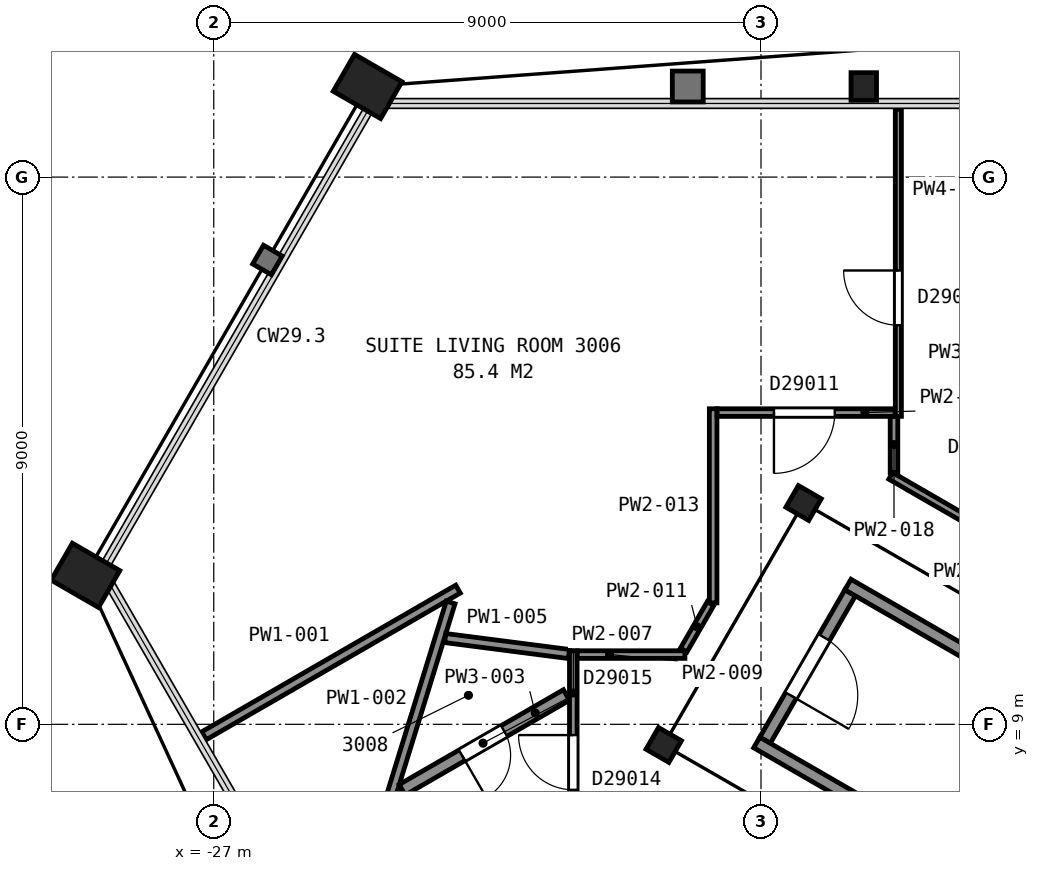
"""IFC4 building model, lengths in metres.
Left out: names, types, materials, properties, quantities, classifications, styles, units other than length and angle.
Written with IfcOpenShell. Run it as: python <this file> out.ifc"""

import sys

from ifc_helpers import new_model, si_unit, direction, frame, frame_2d, origin, origin_2d, place, context, subcontext, project, spatial, rectangle, hollow_rectangle, i_section, extrude, element, fill, save


model = new_model("IFC4")
c1 = context("Model", 3, precision=1e-05, world=origin(), true_north=direction((0.0, 1.0)))
c2 = subcontext(c1, "Body", "Model", "MODEL_VIEW")
j1 = project(units=[si_unit("LENGTHUNIT", "METRE"), si_unit("PLANEANGLEUNIT", "RADIAN")], contexts=[c1])
p1 = place(None, origin())
s1 = spatial("IfcSite", under=j1, at=p1, CompositionType="ELEMENT")
p2 = place(p1, origin())
s2 = spatial("IfcBuilding", under=s1, at=p2, CompositionType="ELEMENT")
p3 = place(p2, frame((0.0, 0.0, 125.2)))
s3 = spatial("IfcBuildingStorey", under=s2, at=p3, CompositionType="ELEMENT", Elevation=125.2)
p4 = place(p3, frame((-16.31, 19.49, 0.0), z_axis=(0.0, 0.0, 1.0), x_axis=(1.0, 0.0, 0.0)))
e1 = element("IfcColumn", 1, at=p4, inside=s3, PredefinedType="COLUMN", context=c2, shape_type="SweptSolid", body=[
    extrude(i_section(OverallWidth=0.419, OverallDepth=0.455, WebThickness=0.042, FlangeThickness=0.068, FilletRadius=0.015, at=origin_2d()), origin(), (0.0, 0.0, 1.0), 3.56),
])
for number, where, z_axis, x_axis in (
    (2, (-24.47, 19.49, 0.0), (0.0, 0.0, 1.0), (0.5, 0.866, 0.0)),
    (3, (-29.11, 11.45, 0.0), (0.0, 0.0, 1.0), (0.5, 0.866, 0.0)),
):
    element("IfcColumn", number, at=place(p3, frame(where, z_axis=z_axis, x_axis=x_axis)), inside=s3, PredefinedType="COLUMN", context=c2, shape_type="SweptSolid", body=[
        extrude(hollow_rectangle(XDim=0.7, YDim=0.9, WallThickness=0.065, at=origin_2d()), origin(), (0.0, 0.0, 1.0), 3.525),
    ])
for number, where, z_axis, x_axis in (
    (4, (-17.3, 12.64, 0.0), (0.0, 0.0, 1.0), (0.5, 0.866, 0.0)),
    (5, (-19.6, 8.66, 0.0), (0.0, 0.0, 1.0), (0.5, 0.866, 0.0)),
):
    element("IfcColumn", number, at=place(p3, frame(where, z_axis=z_axis, x_axis=x_axis)), inside=s3, PredefinedType="COLUMN", context=c2, shape_type="SweptSolid", body=[
        extrude(i_section(OverallWidth=0.411, OverallDepth=0.434, WebThickness=0.036, FlangeThickness=0.057, FilletRadius=0.015, at=origin_2d()), origin(), (0.0, 0.0, 1.0), 3.6),
    ])
p5 = place(p3, frame((-16.534, 11.162, 0.0), z_axis=(0.0, 0.0, 1.0), x_axis=(-0.49998411664, -0.866034573852, 0.0)))
e6 = element("IfcWall", 6, at=p5, inside=s3, PredefinedType="PARTITIONING", context=c2, shape_type="SweptSolid", body=[
    extrude(rectangle(XDim=2.8, YDim=0.2, at=frame_2d((1.4, 0.0))), origin(), (0.0, 0.0, 1.0), 3.35),
])
p6 = place(p5, frame((0.85, 0.0, 0.0)))
e7 = element("IfcOpeningElement", 7, at=p6, cuts=e6, PredefinedType="OPENING", context=c2, shape_type="SweptSolid", body=[
    extrude(rectangle(XDim=1.1, YDim=2.1, at=frame_2d((0.55, 1.05))), frame((0.0, 0.11, 0.0), z_axis=(0.0, -1.0, 0.0), x_axis=(1.0, 0.0, 0.0)), (0.0, 0.0, 1.0), 0.22),
])
for number, where, z_axis, x_axis in (
    (8, (-7.678, 2.701, 0.0), (0.0, 0.0, 1.0), (-0.866, 0.5, 0.0)),
    (9, (-6.178, 5.299, 0.0), (0.0, 0.0, 1.0), (-0.866, 0.5, 0.0)),
):
    element("IfcWall", number, at=place(p3, frame(where, z_axis=z_axis, x_axis=x_axis)), inside=s3, PredefinedType="PARTITIONING", context=c2, shape_type="SweptSolid", body=[
        extrude(rectangle(XDim=12.0, YDim=0.2, at=frame_2d((6.0, 0.0))), origin(), (0.0, 0.0, 1.0), 3.35),
    ])
p7 = place(p3, frame((-27.16, 8.812, 0.0), z_axis=(0.0, 0.0, 1.0), x_axis=(0.866019508262, 0.500010211206, 0.0)))
e10 = element("IfcWall", 10, at=p7, inside=s3, PredefinedType="PARTITIONING", context=c2, shape_type="SweptSolid", body=[
    extrude(rectangle(XDim=4.823, YDim=0.15, at=frame_2d((2.411, 0.0))), origin(), (0.0, 0.0, 1.0), 2.613),
])
p8 = place(p3, frame((-24.087, 7.815, 0.0), z_axis=(0.0, 0.0, 1.0), x_axis=(0.294507330173, 0.955649220412, 0.0)))
e11 = element("IfcWall", 11, at=p8, inside=s3, PredefinedType="PARTITIONING", context=c2, shape_type="SweptSolid", body=[
    extrude(rectangle(XDim=3.337, YDim=0.15, at=frame_2d((1.669, 0.0))), origin(), (0.0, 0.0, 1.0), 2.613),
])
p9 = place(p3, frame((-23.901, 7.923, 0.0), z_axis=(0.0, 0.0, 1.0), x_axis=(0.866072196304, 0.49991894422, 0.0)))
e12 = element("IfcWall", 12, at=p9, inside=s3, PredefinedType="PARTITIONING", context=c2, shape_type="SweptSolid", body=[
    extrude(rectangle(XDim=3.119, YDim=0.2, at=frame_2d((1.56, 0.0))), origin(), (0.0, 0.0, 1.0), 2.613),
])
p10 = place(p9, frame((1.135, 0.0, 0.0)))
e13 = element("IfcOpeningElement", 13, at=p10, cuts=e12, PredefinedType="OPENING", context=c2, shape_type="SweptSolid", body=[
    extrude(rectangle(XDim=0.8, YDim=2.1, at=frame_2d((0.4, 1.05))), frame((0.0, 0.11, 0.0), z_axis=(0.0, -1.0, 0.0), x_axis=(1.0, 0.0, 0.0)), (0.0, 0.0, 1.0), 0.22),
])
p11 = place(p3, frame((-23.193, 10.419, 0.0), z_axis=(0.0, 0.0, 1.0), x_axis=(0.991775429183, -0.127990226455, 0.0)))
e14 = element("IfcWall", 14, at=p11, inside=s3, PredefinedType="PARTITIONING", context=c2, shape_type="SweptSolid", body=[
    extrude(rectangle(XDim=2.051, YDim=0.15, at=frame_2d((1.025, 0.0))), origin(), (0.0, 0.0, 1.0), 2.613),
])
p12 = place(p3, frame((-21.087, 7.111, 0.0), z_axis=(0.0, 0.0, 1.0), x_axis=(0.0, 1.0, 0.0)))
e15 = element("IfcWall", 15, at=p12, inside=s3, PredefinedType="PARTITIONING", context=c2, shape_type="SweptSolid", body=[
    extrude(rectangle(XDim=3.099, YDim=0.125, at=frame_2d((1.549, 0.0))), origin(), (0.0, 0.0, 1.0), 2.613),
])
p13 = place(p12, frame((0.812, 0.0, 0.0)))
e16 = element("IfcOpeningElement", 16, at=p13, cuts=e15, PredefinedType="OPENING", context=c2, shape_type="SweptSolid", body=[
    extrude(rectangle(XDim=0.9, YDim=2.1, at=frame_2d((0.45, 1.05))), frame((0.0, 0.073, 0.0), z_axis=(0.0, -1.0, 0.0), x_axis=(1.0, 0.0, 0.0)), (0.0, 0.0, 1.0), 0.145),
])
p14 = place(p3, frame((-21.022, 10.147, 0.0), z_axis=(0.0, 0.0, 1.0), x_axis=(1.0, 0.0, 0.0)))
e17 = element("IfcWall", 17, at=p14, inside=s3, PredefinedType="PARTITIONING", context=c2, shape_type="SweptSolid", body=[
    extrude(rectangle(XDim=1.771, YDim=0.125, at=frame_2d((0.885, 0.0))), origin(), (0.0, 0.0, 1.0), 2.613),
])
p15 = place(p3, frame((-19.271, 10.221, 0.0), z_axis=(0.0, 0.0, 1.0), x_axis=(0.499881837328, 0.866093614288, 0.0)))
e18 = element("IfcWall", 18, at=p15, inside=s3, PredefinedType="PARTITIONING", context=c2, shape_type="SweptSolid", body=[
    extrude(rectangle(XDim=0.884, YDim=0.125, at=frame_2d((0.442, 0.0))), origin(), (0.0, 0.0, 1.0), 2.613),
])
p16 = place(p3, frame((-18.787, 10.998, 0.0), z_axis=(0.0, 0.0, 1.0), x_axis=(0.0, 1.0, 0.0)))
e19 = element("IfcWall", 19, at=p16, inside=s3, PredefinedType="PARTITIONING", context=c2, shape_type="SweptSolid", body=[
    extrude(rectangle(XDim=3.192, YDim=0.125, at=frame_2d((1.596, 0.0))), origin(), (0.0, 0.0, 1.0), 2.613),
])
p17 = place(p3, frame((-18.722, 14.127, 0.0), z_axis=(0.0, 0.0, 1.0), x_axis=(1.0, 0.0, 0.0)))
e20 = element("IfcWall", 20, at=p17, inside=s3, PredefinedType="PARTITIONING", context=c2, shape_type="SweptSolid", body=[
    extrude(rectangle(XDim=2.927, YDim=0.125, at=frame_2d((1.463, 0.0))), origin(), (0.0, 0.0, 1.0), 2.613),
])
p18 = place(p17, frame((0.935, 0.0, 0.0)))
e21 = element("IfcOpeningElement", 21, at=p18, cuts=e20, PredefinedType="OPENING", context=c2, shape_type="SweptSolid", body=[
    extrude(rectangle(XDim=1.0, YDim=2.1, at=frame_2d((0.5, 1.05))), frame((0.0, 0.073, 0.0), z_axis=(0.0, -1.0, 0.0), x_axis=(1.0, 0.0, 0.0)), (0.0, 0.0, 1.0), 0.145),
])
p19 = place(p3, frame((-15.813, 13.14, 0.0), z_axis=(0.0, 0.0, 1.0), x_axis=(0.0, 1.0, 0.0)))
e22 = element("IfcWall", 22, at=p19, inside=s3, PredefinedType="PARTITIONING", context=c2, shape_type="SweptSolid", body=[
    extrude(rectangle(XDim=0.922, YDim=0.125, at=frame_2d((0.461, 0.0))), origin(), (0.0, 0.0, 1.0), 2.613),
])
p20 = place(p3, frame((-15.867, 13.086, 0.0), z_axis=(0.0, 0.0, 1.0), x_axis=(0.866070231021, -0.499922348909, 0.0)))
e23 = element("IfcWall", 23, at=p20, inside=s3, PredefinedType="PARTITIONING", context=c2, shape_type="SweptSolid", body=[
    extrude(rectangle(XDim=4.088, YDim=0.125, at=frame_2d((2.044, 0.0))), origin(), (0.0, 0.0, 1.0), 2.613),
])
p21 = place(p3, frame((-15.741, 19.115, 0.0), z_axis=(0.0, 0.0, 1.0), x_axis=(0.0, -1.0, 0.0)))
e24 = element("IfcWall", 24, at=p21, inside=s3, PredefinedType="PARTITIONING", context=c2, shape_type="SweptSolid", body=[
    extrude(rectangle(XDim=5.05, YDim=0.1, at=frame_2d((2.525, 0.0))), origin(), (0.0, 0.0, 1.0), 2.613),
])
p22 = place(p21, frame((2.651, 0.0, 0.0)))
e25 = element("IfcOpeningElement", 25, at=p22, cuts=e24, PredefinedType="OPENING", context=c2, shape_type="SweptSolid", body=[
    extrude(rectangle(XDim=0.9, YDim=2.1, at=frame_2d((0.45, 1.05))), frame((0.0, 0.06, 0.0), z_axis=(0.0, -1.0, 0.0), x_axis=(1.0, 0.0, 0.0)), (0.0, 0.0, 1.0), 0.12),
])
p23 = place(p6, origin())
e26 = element("IfcDoor", 26, at=p23, inside=s3, OperationType="SINGLE_SWING_RIGHT", PredefinedType="DOOR", context=c2, shape_type="SweptSolid", body=[
    extrude(rectangle(XDim=1.1, YDim=2.1, at=frame_2d((0.55, 1.05))), frame((0.0, 0.025, 0.0), z_axis=(0.0, -1.0, 0.0), x_axis=(1.0, 0.0, 0.0)), (0.0, 0.0, 1.0), 0.05),
])
fill(e7, e26)
p24 = place(p10, origin())
e27 = element("IfcDoor", 27, at=p24, inside=s3, OperationType="SINGLE_SWING_LEFT", PredefinedType="DOOR", context=c2, shape_type="SweptSolid", body=[
    extrude(rectangle(XDim=0.8, YDim=2.1, at=frame_2d((0.4, 1.05))), frame((0.0, 0.025, 0.0), z_axis=(0.0, -1.0, 0.0), x_axis=(1.0, 0.0, 0.0)), (0.0, 0.0, 1.0), 0.05),
])
fill(e13, e27)
p25 = place(p13, origin())
e28 = element("IfcDoor", 28, at=p25, inside=s3, OperationType="SINGLE_SWING_RIGHT", PredefinedType="DOOR", context=c2, shape_type="SweptSolid", body=[
    extrude(rectangle(XDim=0.9, YDim=2.1, at=frame_2d((0.45, 1.05))), frame((0.0, 0.025, 0.0), z_axis=(0.0, -1.0, 0.0), x_axis=(1.0, 0.0, 0.0)), (0.0, 0.0, 1.0), 0.05),
])
fill(e16, e28)
p26 = place(p18, origin())
e29 = element("IfcDoor", 29, at=p26, inside=s3, OperationType="SINGLE_SWING_LEFT", PredefinedType="DOOR", context=c2, shape_type="SweptSolid", body=[
    extrude(rectangle(XDim=1.0, YDim=2.1, at=frame_2d((0.5, 1.05))), frame((0.0, 0.025, 0.0), z_axis=(0.0, -1.0, 0.0), x_axis=(1.0, 0.0, 0.0)), (0.0, 0.0, 1.0), 0.05),
])
fill(e21, e29)
p27 = place(p22, origin())
e30 = element("IfcDoor", 30, at=p27, inside=s3, OperationType="SINGLE_SWING_LEFT", PredefinedType="DOOR", context=c2, shape_type="SweptSolid", body=[
    extrude(rectangle(XDim=0.9, YDim=2.1, at=frame_2d((0.45, 1.05))), frame((0.0, 0.025, 0.0), z_axis=(0.0, -1.0, 0.0), x_axis=(1.0, 0.0, 0.0)), (0.0, 0.0, 1.0), 0.05),
])
fill(e25, e30)
save(model, sys.argv[1])
